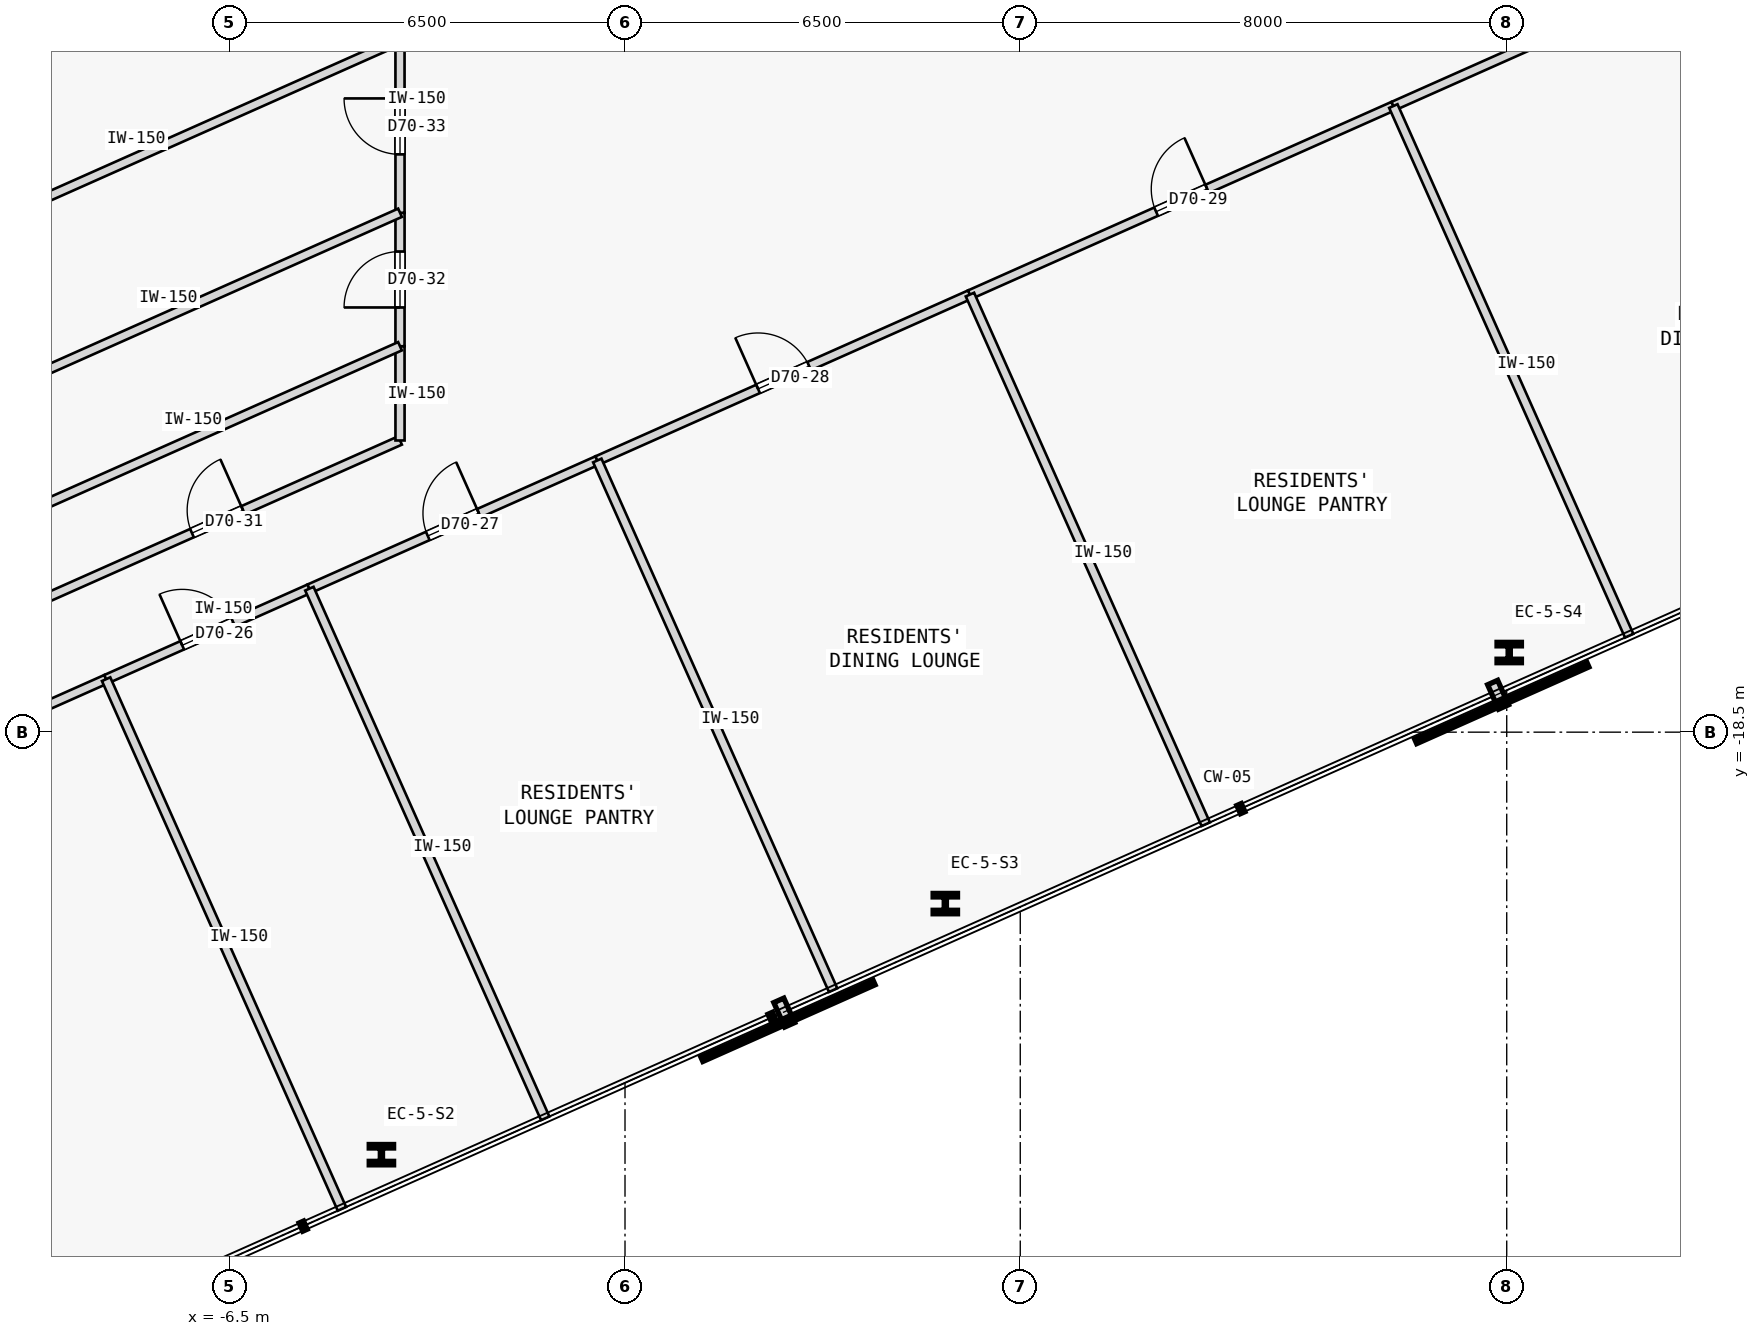
"""IFC4 building model, lengths in metres.
Left out: names, types, materials, properties, quantities, classifications, styles, units other than length and angle.
Written with IfcOpenShell. Run it as: python <this file> out.ifc"""

import sys

from ifc_helpers import new_model, si_unit, direction, frame, frame_2d, origin, origin_2d, place, context, subcontext, project, spatial, rectangle, i_section, extrude, element, fill, save


model = new_model("IFC4")
c1 = context("Model", 3, precision=1e-05, world=origin(), true_north=direction((0.0, 1.0)))
c2 = subcontext(c1, "Body", "Model", "MODEL_VIEW")
j1 = project(units=[si_unit("LENGTHUNIT", "METRE"), si_unit("PLANEANGLEUNIT", "RADIAN")], contexts=[c1])
p1 = place(None, origin())
s1 = spatial("IfcSite", under=j1, at=p1, CompositionType="ELEMENT")
p2 = place(p1, origin())
s2 = spatial("IfcBuilding", under=s1, at=p2, CompositionType="ELEMENT")
p3 = place(p2, frame((0.0, 0.0, 262.2)))
s3 = spatial("IfcBuildingStorey", under=s2, at=p3, CompositionType="ELEMENT", Elevation=262.2)
for number, where, z_axis, x_axis in (
    (1, (-4.006, -25.448, 0.0), (0.0, 0.0, 1.0), (1.0, 0.0, 0.0)),
    (2, (5.268, -21.319, 0.0), (0.0, 0.0, 1.0), (1.0, 0.0, 0.0)),
    (3, (14.541, -17.19, 0.0), (0.0, 0.0, 1.0), (1.0, 0.0, 0.0)),
):
    element("IfcColumn", number, at=place(p3, frame(where, z_axis=z_axis, x_axis=x_axis)), inside=s3, PredefinedType="COLUMN", context=c2, shape_type="SweptSolid", body=[
        extrude(i_section(OverallWidth=0.401, OverallDepth=0.335, WebThickness=0.036, FlangeThickness=0.058, FilletRadius=0.015, at=origin_2d()), origin(), (0.0, 0.0, 1.0), 3.35),
    ])
p4 = place(p3, frame((-11.868, -19.113, 0.0), z_axis=(0.0, 0.0, 1.0), x_axis=(0.913543802, 0.40674036169, 0.0)))
e4 = element("IfcWall", 4, at=p4, inside=s3, PredefinedType="PARTITIONING", context=c2, shape_type="SweptSolid", body=[
    extrude(rectangle(XDim=3.65, YDim=0.15, at=frame_2d((1.825, 0.0))), origin(), (0.0, 0.0, 1.0), 3.125),
])
p5 = place(p3, frame((-8.533, -17.628, 0.0), z_axis=(0.0, 0.0, 1.0), x_axis=(0.913560976273, 0.406701785873, 0.0)))
e5 = element("IfcWall", 5, at=p5, inside=s3, PredefinedType="PARTITIONING", context=c2, shape_type="SweptSolid", body=[
    extrude(rectangle(XDim=3.659, YDim=0.15, at=frame_2d((1.829, 0.0))), origin(), (0.0, 0.0, 1.0), 3.125),
])
p6 = place(p5, frame((1.369, 0.0, 0.0)))
e6 = element("IfcOpeningElement", 6, at=p6, cuts=e5, PredefinedType="OPENING", context=c2, shape_type="SweptSolid", body=[
    extrude(rectangle(XDim=0.92, YDim=2.15, at=frame_2d((0.46, 1.075))), frame((0.0, 0.085, 0.0), z_axis=(0.0, -1.0, 0.0), x_axis=(1.0, 0.0, 0.0)), (0.0, 0.0, 1.0), 0.17),
])
p7 = place(p3, frame((-5.191, -16.14, 0.0), z_axis=(0.0, 0.0, 1.0), x_axis=(0.913541346619, 0.40674587646, 0.0)))
e7 = element("IfcWall", 7, at=p7, inside=s3, PredefinedType="PARTITIONING", context=c2, shape_type="SweptSolid", body=[
    extrude(rectangle(XDim=5.183, YDim=0.15, at=frame_2d((2.591, 0.0))), origin(), (0.0, 0.0, 1.0), 3.125),
])
p8 = place(p7, frame((2.132, 0.0, 0.0)))
e8 = element("IfcOpeningElement", 8, at=p8, cuts=e7, PredefinedType="OPENING", context=c2, shape_type="SweptSolid", body=[
    extrude(rectangle(XDim=0.92, YDim=2.15, at=frame_2d((0.46, 1.075))), frame((0.0, 0.085, 0.0), z_axis=(0.0, -1.0, 0.0), x_axis=(1.0, 0.0, 0.0)), (0.0, 0.0, 1.0), 0.17),
])
p9 = place(p3, frame((-0.456, -14.032, 0.0), z_axis=(0.0, 0.0, 1.0), x_axis=(0.913541200883, 0.40674620378, 0.0)))
e9 = element("IfcWall", 9, at=p9, inside=s3, PredefinedType="PARTITIONING", context=c2, shape_type="SweptSolid", body=[
    extrude(rectangle(XDim=6.708, YDim=0.15, at=frame_2d((3.354, 0.0))), origin(), (0.0, 0.0, 1.0), 3.125),
])
p10 = place(p9, frame((2.894, 0.0, 0.0)))
e10 = element("IfcOpeningElement", 10, at=p10, cuts=e9, PredefinedType="OPENING", context=c2, shape_type="SweptSolid", body=[
    extrude(rectangle(XDim=0.92, YDim=2.15, at=frame_2d((0.46, 1.075))), frame((0.0, 0.085, 0.0), z_axis=(0.0, -1.0, 0.0), x_axis=(1.0, 0.0, 0.0)), (0.0, 0.0, 1.0), 0.17),
])
p11 = place(p3, frame((5.672, -11.304, 0.0), z_axis=(0.0, 0.0, 1.0), x_axis=(0.913549829505, 0.40672682357, 0.0)))
e11 = element("IfcWall", 11, at=p11, inside=s3, PredefinedType="PARTITIONING", context=c2, shape_type="SweptSolid", body=[
    extrude(rectangle(XDim=7.622, YDim=0.15, at=frame_2d((3.811, 0.0))), origin(), (0.0, 0.0, 1.0), 3.125),
])
p12 = place(p11, frame((3.351, 0.0, 0.0)))
e12 = element("IfcOpeningElement", 12, at=p12, cuts=e11, PredefinedType="OPENING", context=c2, shape_type="SweptSolid", body=[
    extrude(rectangle(XDim=0.92, YDim=2.15, at=frame_2d((0.46, 1.075))), frame((0.0, 0.085, 0.0), z_axis=(0.0, -1.0, 0.0), x_axis=(1.0, 0.0, 0.0)), (0.0, 0.0, 1.0), 0.17),
])
p13 = place(p3, frame((12.635, -8.204, 0.0), z_axis=(0.0, 0.0, 1.0), x_axis=(0.913541702649, 0.406745076825, 0.0)))
e13 = element("IfcWall", 13, at=p13, inside=s3, PredefinedType="PARTITIONING", context=c2, shape_type="SweptSolid", body=[
    extrude(rectangle(XDim=7.318, YDim=0.15, at=frame_2d((3.659, 0.0))), origin(), (0.0, 0.0, 1.0), 3.125),
])
p14 = place(p13, frame((3.199, 0.0, 0.0)))
e14 = element("IfcOpeningElement", 14, at=p14, cuts=e13, PredefinedType="OPENING", context=c2, shape_type="SweptSolid", body=[
    extrude(rectangle(XDim=0.92, YDim=2.15, at=frame_2d((0.46, 1.075))), frame((0.0, 0.085, 0.0), z_axis=(0.0, -1.0, 0.0), x_axis=(1.0, 0.0, 0.0)), (0.0, 0.0, 1.0), 0.17),
])
p15 = place(p3, frame((-9.702, -16.375, 0.0), z_axis=(0.0, 0.0, 1.0), x_axis=(0.913552389019, 0.406721074594, 0.0)))
e15 = element("IfcWall", 15, at=p15, inside=s3, PredefinedType="PARTITIONING", context=c2, shape_type="SweptSolid", body=[
    extrude(rectangle(XDim=6.57, YDim=0.15, at=frame_2d((3.285, 0.0))), origin(), (0.0, 0.0, 1.0), 3.125),
])
p16 = place(p15, frame((2.825, 0.0, 0.0)))
e16 = element("IfcOpeningElement", 16, at=p16, cuts=e15, PredefinedType="OPENING", context=c2, shape_type="SweptSolid", body=[
    extrude(rectangle(XDim=0.92, YDim=2.15, at=frame_2d((0.46, 1.075))), frame((0.0, 0.085, 0.0), z_axis=(0.0, -1.0, 0.0), x_axis=(1.0, 0.0, 0.0)), (0.0, 0.0, 1.0), 0.17),
])
p17 = place(p3, frame((-3.7, -13.703, 0.0), z_axis=(0.0, 0.0, 1.0), x_axis=(-0.000157529929, 0.999999987592, 0.0)))
e17 = element("IfcWall", 17, at=p17, inside=s3, PredefinedType="PARTITIONING", context=c2, shape_type="SweptSolid", body=[
    extrude(rectangle(XDim=1.55, YDim=0.15, at=frame_2d((0.775, 0.0))), origin(), (0.0, 0.0, 1.0), 3.125),
])
p18 = place(p3, frame((-3.7, -12.154, 0.0), z_axis=(0.0, 0.0, 1.0), x_axis=(0.000111222333, 0.999999993815, 0.0)))
e18 = element("IfcWall", 18, at=p18, inside=s3, PredefinedType="PARTITIONING", context=c2, shape_type="SweptSolid", body=[
    extrude(rectangle(XDim=2.195, YDim=0.15, at=frame_2d((1.098, 0.0))), origin(), (0.0, 0.0, 1.0), 3.125),
])
p19 = place(p18, frame((0.637, 0.0, 0.0)))
e19 = element("IfcOpeningElement", 19, at=p19, cuts=e18, PredefinedType="OPENING", context=c2, shape_type="SweptSolid", body=[
    extrude(rectangle(XDim=0.92, YDim=2.15, at=frame_2d((0.46, 1.075))), frame((0.0, 0.085, 0.0), z_axis=(0.0, -1.0, 0.0), x_axis=(1.0, 0.0, 0.0)), (0.0, 0.0, 1.0), 0.17),
])
p20 = place(p3, frame((-3.7, -9.958, 0.0), z_axis=(0.0, 0.0, 1.0), x_axis=(-0.000171909917, 0.999999985223, 0.0)))
e20 = element("IfcWall", 20, at=p20, inside=s3, PredefinedType="PARTITIONING", context=c2, shape_type="SweptSolid", body=[
    extrude(rectangle(XDim=2.84, YDim=0.15, at=frame_2d((1.42, 0.0))), origin(), (0.0, 0.0, 1.0), 3.125),
])
p21 = place(p20, frame((0.96, 0.0, 0.0)))
e21 = element("IfcOpeningElement", 21, at=p21, cuts=e20, PredefinedType="OPENING", context=c2, shape_type="SweptSolid", body=[
    extrude(rectangle(XDim=0.92, YDim=2.15, at=frame_2d((0.46, 1.075))), frame((0.0, 0.085, 0.0), z_axis=(0.0, -1.0, 0.0), x_axis=(1.0, 0.0, 0.0)), (0.0, 0.0, 1.0), 0.17),
])
for number, where, z_axis, x_axis in (
    (22, (-4.655, -26.339, 0.0), (0.0, 0.0, 1.0), (-0.407, 0.914, 0.0)),
    (23, (-1.312, -24.851, 0.0), (0.0, 0.0, 1.0), (-0.407, 0.914, 0.0)),
):
    element("IfcWall", number, at=place(p3, frame(where, z_axis=z_axis, x_axis=x_axis)), inside=s3, PredefinedType="PARTITIONING", context=c2, shape_type="SweptSolid", body=[
        extrude(rectangle(XDim=9.535, YDim=0.15, at=frame_2d((4.768, 0.0))), origin(), (0.0, 0.0, 1.0), 3.125),
    ])
p22 = place(p3, frame((3.423, -22.743, 0.0), z_axis=(0.0, 0.0, 1.0), x_axis=(-0.406751296215, 0.913538933504, 0.0)))
e24 = element("IfcWall", 24, at=p22, inside=s3, PredefinedType="PARTITIONING", context=c2, shape_type="SweptSolid", body=[
    extrude(rectangle(XDim=9.535, YDim=0.15, at=frame_2d((4.768, 0.0))), origin(), (0.0, 0.0, 1.0), 3.125),
])
for number, where, z_axis, x_axis in (
    (25, (9.551, -20.014, 0.0), (0.0, 0.0, 1.0), (-0.407, 0.914, 0.0)),
    (26, (16.514, -16.914, 0.0), (0.0, 0.0, 1.0), (-0.407, 0.914, 0.0)),
):
    element("IfcWall", number, at=place(p3, frame(where, z_axis=z_axis, x_axis=x_axis)), inside=s3, PredefinedType="PARTITIONING", context=c2, shape_type="SweptSolid", body=[
        extrude(rectangle(XDim=9.535, YDim=0.15, at=frame_2d((4.768, 0.0))), origin(), (0.0, 0.0, 1.0), 3.125),
    ])
p23 = place(p3, frame((-10.278, -15.082, 0.0), z_axis=(0.0, 0.0, 1.0), x_axis=(0.913549882956, 0.406726703513, 0.0)))
e27 = element("IfcWall", 27, at=p23, inside=s3, PredefinedType="PARTITIONING", context=c2, shape_type="SweptSolid", body=[
    extrude(rectangle(XDim=7.2, YDim=0.15, at=frame_2d((3.6, 0.0))), origin(), (0.0, 0.0, 1.0), 3.125),
])
p24 = place(p3, frame((-11.093, -13.25, 0.0), z_axis=(0.0, 0.0, 1.0), x_axis=(0.913543891457, 0.406740160767, 0.0)))
e28 = element("IfcWall", 28, at=p24, inside=s3, PredefinedType="PARTITIONING", context=c2, shape_type="SweptSolid", body=[
    extrude(rectangle(XDim=8.093, YDim=0.15, at=frame_2d((4.046, 0.0))), origin(), (0.0, 0.0, 1.0), 3.125),
])
p25 = place(p3, frame((-12.149, -10.88, 0.0), z_axis=(0.0, 0.0, 1.0), x_axis=(0.913542450291, 0.406743397631, 0.0)))
e29 = element("IfcWall", 29, at=p25, inside=s3, PredefinedType="PARTITIONING", context=c2, shape_type="SweptSolid", body=[
    extrude(rectangle(XDim=9.248, YDim=0.15, at=frame_2d((4.624, 0.0))), origin(), (0.0, 0.0, 1.0), 3.125),
])
p26 = place(p3, frame((-13.348, -8.186, 0.0), z_axis=(0.0, 0.0, 1.0), x_axis=(0.913551673432, 0.406722681896, 0.0)))
e30 = element("IfcWall", 30, at=p26, inside=s3, PredefinedType="PARTITIONING", context=c2, shape_type="SweptSolid", body=[
    extrude(rectangle(XDim=6.358, YDim=0.15, at=frame_2d((3.179, 0.0))), origin(), (0.0, 0.0, 1.0), 3.125),
])
p27 = place(p26, frame((0.939, 0.0, 0.0)))
e31 = element("IfcOpeningElement", 31, at=p27, cuts=e30, PredefinedType="OPENING", context=c2, shape_type="SweptSolid", body=[
    extrude(rectangle(XDim=0.92, YDim=2.15, at=frame_2d((0.46, 1.075))), frame((0.0, 0.085, 0.0), z_axis=(0.0, -1.0, 0.0), x_axis=(1.0, 0.0, 0.0)), (0.0, 0.0, 1.0), 0.17),
])
p28 = place(p6, origin())
e32 = element("IfcDoor", 32, at=p28, inside=s3, OperationType="SINGLE_SWING_LEFT", PredefinedType="DOOR", context=c2, shape_type="SweptSolid", body=[
    extrude(rectangle(XDim=0.92, YDim=2.15, at=frame_2d((0.46, 1.075))), frame((0.0, 0.025, 0.0), z_axis=(0.0, -1.0, 0.0), x_axis=(1.0, 0.0, 0.0)), (0.0, 0.0, 1.0), 0.05),
])
fill(e6, e32)
p29 = place(p8, origin())
e33 = element("IfcDoor", 33, at=p29, inside=s3, OperationType="SINGLE_SWING_RIGHT", PredefinedType="DOOR", context=c2, shape_type="SweptSolid", body=[
    extrude(rectangle(XDim=0.92, YDim=2.15, at=frame_2d((0.46, 1.075))), frame((0.0, 0.025, 0.0), z_axis=(0.0, -1.0, 0.0), x_axis=(1.0, 0.0, 0.0)), (0.0, 0.0, 1.0), 0.05),
])
fill(e8, e33)
p30 = place(p10, origin())
e34 = element("IfcDoor", 34, at=p30, inside=s3, OperationType="SINGLE_SWING_LEFT", PredefinedType="DOOR", context=c2, shape_type="SweptSolid", body=[
    extrude(rectangle(XDim=0.92, YDim=2.15, at=frame_2d((0.46, 1.075))), frame((0.0, 0.025, 0.0), z_axis=(0.0, -1.0, 0.0), x_axis=(1.0, 0.0, 0.0)), (0.0, 0.0, 1.0), 0.05),
])
fill(e10, e34)
p31 = place(p12, origin())
e35 = element("IfcDoor", 35, at=p31, inside=s3, OperationType="SINGLE_SWING_RIGHT", PredefinedType="DOOR", context=c2, shape_type="SweptSolid", body=[
    extrude(rectangle(XDim=0.92, YDim=2.15, at=frame_2d((0.46, 1.075))), frame((0.0, 0.025, 0.0), z_axis=(0.0, -1.0, 0.0), x_axis=(1.0, 0.0, 0.0)), (0.0, 0.0, 1.0), 0.05),
])
fill(e12, e35)
p32 = place(p16, origin())
e36 = element("IfcDoor", 36, at=p32, inside=s3, OperationType="SINGLE_SWING_RIGHT", PredefinedType="DOOR", context=c2, shape_type="SweptSolid", body=[
    extrude(rectangle(XDim=0.92, YDim=2.15, at=frame_2d((0.46, 1.075))), frame((0.0, 0.025, 0.0), z_axis=(0.0, -1.0, 0.0), x_axis=(1.0, 0.0, 0.0)), (0.0, 0.0, 1.0), 0.05),
])
fill(e16, e36)
p33 = place(p19, origin())
e37 = element("IfcDoor", 37, at=p33, inside=s3, OperationType="SINGLE_SWING_LEFT", PredefinedType="DOOR", context=c2, shape_type="SweptSolid", body=[
    extrude(rectangle(XDim=0.92, YDim=2.15, at=frame_2d((0.46, 1.075))), frame((0.0, 0.025, 0.0), z_axis=(0.0, -1.0, 0.0), x_axis=(1.0, 0.0, 0.0)), (0.0, 0.0, 1.0), 0.05),
])
fill(e19, e37)
p34 = place(p21, origin())
e38 = element("IfcDoor", 38, at=p34, inside=s3, OperationType="SINGLE_SWING_RIGHT", PredefinedType="DOOR", context=c2, shape_type="SweptSolid", body=[
    extrude(rectangle(XDim=0.92, YDim=2.15, at=frame_2d((0.46, 1.075))), frame((0.0, 0.025, 0.0), z_axis=(0.0, -1.0, 0.0), x_axis=(1.0, 0.0, 0.0)), (0.0, 0.0, 1.0), 0.05),
])
fill(e21, e38)
save(model, sys.argv[1])
